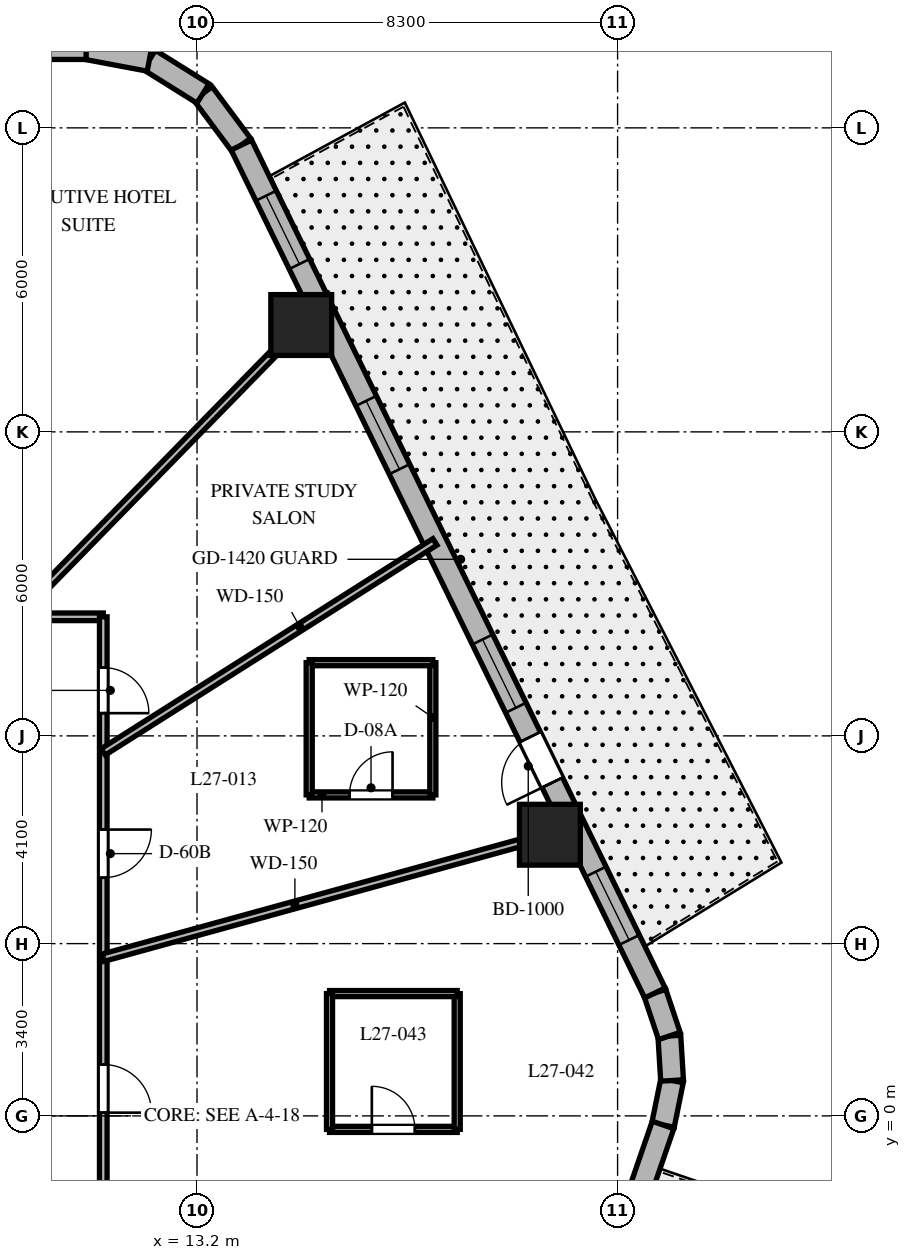
"""IFC4 building model, lengths in metres.
Left out: names, types, materials, properties, quantities, classifications, styles, units other than length and angle.
Written with IfcOpenShell. Run it as: python <this file> out.ifc"""

import sys

from ifc_helpers import new_model, si_unit, direction, frame, frame_2d, origin, origin_2d, place, context, subcontext, project, spatial, rectangle, extrude, element, fill, save


model = new_model("IFC4")
c1 = context("Model", 3, precision=1e-05, world=origin(), true_north=direction((0.0, 1.0)))
c2 = subcontext(c1, "Body", "Model", "MODEL_VIEW")
j1 = project(units=[si_unit("LENGTHUNIT", "METRE"), si_unit("PLANEANGLEUNIT", "RADIAN")], contexts=[c1])
p1 = place(None, origin())
s1 = spatial("IfcSite", under=j1, at=p1, CompositionType="ELEMENT")
p2 = place(p1, origin())
s2 = spatial("IfcBuilding", under=s1, at=p2, CompositionType="ELEMENT")
p3 = place(p2, frame((0.0, 0.0, 113.6)))
s3 = spatial("IfcBuildingStorey", under=s2, at=p3, CompositionType="ELEMENT", Elevation=113.6)
for number, where, z_axis, x_axis in (
    (1, (20.164, 5.549, 0.0), (0.0, 0.0, 1.0), (1.0, 0.0, 0.0)),
    (2, (15.257, 15.609, 0.0), (0.0, 0.0, 1.0), (1.0, 0.0, 0.0)),
):
    element("IfcColumn", number, at=place(p3, frame(where, z_axis=z_axis, x_axis=x_axis)), inside=s3, PredefinedType="COLUMN", context=c2, shape_type="SweptSolid", body=[
        extrude(rectangle(XDim=1.2, YDim=1.2, at=origin_2d()), origin(), (0.0, 0.0, 1.0), 3.7),
    ])
p4 = place(p3, frame((22.397, -0.179, 0.0), z_axis=(0.0, 0.0, 1.0), x_axis=(0.199313589404, 0.979935759669, 0.0)))
e3 = element("IfcWall", 3, at=p4, inside=s3, PredefinedType="SOLIDWALL", context=c2, shape_type="SweptSolid", body=[
    extrude(rectangle(XDim=0.896, YDim=0.45, at=frame_2d((0.448, 0.0))), origin(), (0.0, 0.0, 1.0), 3.4),
])
p5 = place(p3, frame((22.575, 0.698, 0.0), z_axis=(0.0, 0.0, 1.0), x_axis=(-0.060980441946, 0.998138961117, 0.0)))
e4 = element("IfcWall", 4, at=p5, inside=s3, PredefinedType="SOLIDWALL", context=c2, shape_type="SweptSolid", body=[
    extrude(rectangle(XDim=0.881, YDim=0.45, at=frame_2d((0.44, 0.0))), origin(), (0.0, 0.0, 1.0), 3.4),
])
p6 = place(p3, frame((22.522, 1.577, 0.0), z_axis=(0.0, 0.0, 1.0), x_axis=(-0.317372694837, 0.948300887151, 0.0)))
e5 = element("IfcWall", 5, at=p6, inside=s3, PredefinedType="SOLIDWALL", context=c2, shape_type="SweptSolid", body=[
    extrude(rectangle(XDim=0.896, YDim=0.45, at=frame_2d((0.448, 0.0))), origin(), (0.0, 0.0, 1.0), 3.4),
])
p7 = place(p3, frame((14.076, 19.161, 0.0), z_axis=(0.0, 0.0, 1.0), x_axis=(-0.597226657159, 0.802072515412, 0.0)))
e6 = element("IfcWall", 6, at=p7, inside=s3, PredefinedType="SOLIDWALL", context=c2, shape_type="SweptSolid", body=[
    extrude(rectangle(XDim=1.269, YDim=0.45, at=frame_2d((0.635, 0.0))), origin(), (0.0, 0.0, 1.0), 3.4),
])
p8 = place(p3, frame((13.318, 20.179, 0.0), z_axis=(0.0, 0.0, 1.0), x_axis=(-0.848031272749, 0.529946186362, 0.0)))
e7 = element("IfcWall", 7, at=p8, inside=s3, PredefinedType="SOLIDWALL", context=c2, shape_type="SweptSolid", body=[
    extrude(rectangle(XDim=1.248, YDim=0.45, at=frame_2d((0.624, 0.0))), origin(), (0.0, 0.0, 1.0), 3.4),
])
p9 = place(p3, frame((12.259, 20.84, 0.0), z_axis=(0.0, 0.0, 1.0), x_axis=(-0.982730354425, 0.185043374624, 0.0)))
e8 = element("IfcWall", 8, at=p9, inside=s3, PredefinedType="SOLIDWALL", context=c2, shape_type="SweptSolid", body=[
    extrude(rectangle(XDim=1.269, YDim=0.45, at=frame_2d((0.635, 0.0))), origin(), (0.0, 0.0, 1.0), 3.4),
])
p10 = place(p3, frame((15.992, -18.777, 0.0), z_axis=(0.0, 0.0, 1.0), x_axis=(0.325606988926, 0.945505202927, 0.0)))
e9 = element("IfcWall", 9, at=p10, inside=s3, PredefinedType="SOLIDWALL", context=c2, shape_type="SweptSolid", body=[
    extrude(rectangle(XDim=19.669, YDim=0.45, at=frame_2d((9.835, 0.0))), origin(), (0.0, 0.0, 1.0), 3.4),
])
p11 = place(p10, frame((4.909, 0.0, 0.0)))
e10 = element("IfcOpeningElement", 10, at=p11, cuts=e9, PredefinedType="OPENING", context=c2, shape_type="SweptSolid", body=[
    extrude(rectangle(XDim=0.95, YDim=2.15, at=frame_2d((0.475, 1.075))), frame((0.0, 0.235, 0.0), z_axis=(0.0, -1.0, 0.0), x_axis=(1.0, 0.0, 0.0)), (0.0, 0.0, 1.0), 0.47),
])
p12 = place(p10, frame((1.197, 0.0, 0.8)))
e11 = element("IfcOpeningElement", 11, at=p12, cuts=e9, PredefinedType="OPENING", context=c2, shape_type="SweptSolid", body=[
    extrude(rectangle(XDim=1.5, YDim=1.8, at=frame_2d((0.75, 0.9))), frame((0.0, 0.235, 0.0), z_axis=(0.0, -1.0, 0.0), x_axis=(1.0, 0.0, 0.0)), (0.0, 0.0, 1.0), 0.47),
])
p13 = place(p10, frame((6.714, 0.0, 0.8)))
e12 = element("IfcOpeningElement", 12, at=p13, cuts=e9, PredefinedType="OPENING", context=c2, shape_type="SweptSolid", body=[
    extrude(rectangle(XDim=1.5, YDim=1.8, at=frame_2d((0.75, 0.9))), frame((0.0, 0.235, 0.0), z_axis=(0.0, -1.0, 0.0), x_axis=(1.0, 0.0, 0.0)), (0.0, 0.0, 1.0), 0.47),
])
p14 = place(p10, frame((11.53, 0.0, 0.8)))
e13 = element("IfcOpeningElement", 13, at=p14, cuts=e9, PredefinedType="OPENING", context=c2, shape_type="SweptSolid", body=[
    extrude(rectangle(XDim=1.5, YDim=1.8, at=frame_2d((0.75, 0.9))), frame((0.0, 0.235, 0.0), z_axis=(0.0, -1.0, 0.0), x_axis=(1.0, 0.0, 0.0)), (0.0, 0.0, 1.0), 0.47),
])
p15 = place(p10, frame((16.918, 0.0, 0.8)))
e14 = element("IfcOpeningElement", 14, at=p15, cuts=e9, PredefinedType="OPENING", context=c2, shape_type="SweptSolid", body=[
    extrude(rectangle(XDim=1.5, YDim=1.8, at=frame_2d((0.75, 0.9))), frame((0.0, 0.235, 0.0), z_axis=(0.0, -1.0, 0.0), x_axis=(1.0, 0.0, 0.0)), (0.0, 0.0, 1.0), 0.47),
])
p16 = place(p3, frame((22.238, 2.427, 0.0), z_axis=(0.0, 0.0, 1.0), x_axis=(-0.438374803278, 0.898792262901, 0.0)))
e15 = element("IfcWall", 15, at=p16, inside=s3, PredefinedType="SOLIDWALL", context=c2, shape_type="SweptSolid", body=[
    extrude(rectangle(XDim=18.618, YDim=0.45, at=frame_2d((9.309, 0.0))), origin(), (0.0, 0.0, 1.0), 3.4),
])
p17 = place(p16, frame((4.62, 0.0, 0.0)))
e16 = element("IfcOpeningElement", 16, at=p17, cuts=e15, PredefinedType="OPENING", context=c2, shape_type="SweptSolid", body=[
    extrude(rectangle(XDim=1.0, YDim=2.15, at=frame_2d((0.5, 1.075))), frame((0.0, 0.235, 0.0), z_axis=(0.0, -1.0, 0.0), x_axis=(1.0, 0.0, 0.0)), (0.0, 0.0, 1.0), 0.47),
])
p18 = place(p16, frame((6.262, 0.0, 0.8)))
e17 = element("IfcOpeningElement", 17, at=p18, cuts=e15, PredefinedType="OPENING", context=c2, shape_type="SweptSolid", body=[
    extrude(rectangle(XDim=1.5, YDim=1.8, at=frame_2d((0.75, 0.9))), frame((0.0, 0.235, 0.0), z_axis=(0.0, -1.0, 0.0), x_axis=(1.0, 0.0, 0.0)), (0.0, 0.0, 1.0), 0.47),
])
p19 = place(p16, frame((11.501, 0.0, 0.8)))
e18 = element("IfcOpeningElement", 18, at=p19, cuts=e15, PredefinedType="OPENING", context=c2, shape_type="SweptSolid", body=[
    extrude(rectangle(XDim=1.5, YDim=1.8, at=frame_2d((0.75, 0.9))), frame((0.0, 0.235, 0.0), z_axis=(0.0, -1.0, 0.0), x_axis=(1.0, 0.0, 0.0)), (0.0, 0.0, 1.0), 0.47),
])
p20 = place(p16, frame((16.006, 0.0, 0.8)))
e19 = element("IfcOpeningElement", 19, at=p20, cuts=e15, PredefinedType="OPENING", context=c2, shape_type="SweptSolid", body=[
    extrude(rectangle(XDim=1.5, YDim=1.8, at=frame_2d((0.75, 0.9))), frame((0.0, 0.235, 0.0), z_axis=(0.0, -1.0, 0.0), x_axis=(1.0, 0.0, 0.0)), (0.0, 0.0, 1.0), 0.47),
])
p21 = place(p16, frame((1.163, 0.0, 0.8)))
e20 = element("IfcOpeningElement", 20, at=p21, cuts=e15, PredefinedType="OPENING", context=c2, shape_type="SweptSolid", body=[
    extrude(rectangle(XDim=1.5, YDim=1.8, at=frame_2d((0.75, 0.9))), frame((0.0, 0.235, 0.0), z_axis=(0.0, -1.0, 0.0), x_axis=(1.0, 0.0, 0.0)), (0.0, 0.0, 1.0), 0.47),
])
p22 = place(p3, frame((11.012, 21.075, 0.0), z_axis=(0.0, 0.0, 1.0), x_axis=(-1.0, 0.0, 0.0)))
e21 = element("IfcWall", 21, at=p22, inside=s3, PredefinedType="SOLIDWALL", context=c2, shape_type="SweptSolid", body=[
    extrude(rectangle(XDim=23.782, YDim=0.45, at=frame_2d((11.891, 0.0))), origin(), (0.0, 0.0, 1.0), 3.4),
])
p23 = place(p22, frame((1.542, 0.0, 0.8)))
e22 = element("IfcOpeningElement", 22, at=p23, cuts=e21, PredefinedType="OPENING", context=c2, shape_type="SweptSolid", body=[
    extrude(rectangle(XDim=1.5, YDim=1.8, at=frame_2d((0.75, 0.9))), frame((0.0, 0.235, 0.0), z_axis=(0.0, -1.0, 0.0), x_axis=(1.0, 0.0, 0.0)), (0.0, 0.0, 1.0), 0.47),
])
p24 = place(p22, frame((7.82, 0.0, 0.8)))
e23 = element("IfcOpeningElement", 23, at=p24, cuts=e21, PredefinedType="OPENING", context=c2, shape_type="SweptSolid", body=[
    extrude(rectangle(XDim=1.5, YDim=1.8, at=frame_2d((0.75, 0.9))), frame((0.0, 0.235, 0.0), z_axis=(0.0, -1.0, 0.0), x_axis=(1.0, 0.0, 0.0)), (0.0, 0.0, 1.0), 0.47),
])
p25 = place(p22, frame((14.388, 0.0, 0.8)))
e24 = element("IfcOpeningElement", 24, at=p25, cuts=e21, PredefinedType="OPENING", context=c2, shape_type="SweptSolid", body=[
    extrude(rectangle(XDim=1.5, YDim=1.8, at=frame_2d((0.75, 0.9))), frame((0.0, 0.235, 0.0), z_axis=(0.0, -1.0, 0.0), x_axis=(1.0, 0.0, 0.0)), (0.0, 0.0, 1.0), 0.47),
])
p26 = place(p22, frame((20.741, 0.0, 0.8)))
e25 = element("IfcOpeningElement", 25, at=p26, cuts=e21, PredefinedType="OPENING", context=c2, shape_type="SweptSolid", body=[
    extrude(rectangle(XDim=1.5, YDim=1.8, at=frame_2d((0.75, 0.9))), frame((0.0, 0.235, 0.0), z_axis=(0.0, -1.0, 0.0), x_axis=(1.0, 0.0, 0.0)), (0.0, 0.0, 1.0), 0.47),
])
p27 = place(p3, frame((-11.35, 9.85, 0.0), z_axis=(0.0, 0.0, 1.0), x_axis=(1.0, 0.0, 0.0)))
e26 = element("IfcWall", 26, at=p27, inside=s3, PredefinedType="PARTITIONING", context=c2, shape_type="SweptSolid", body=[
    extrude(rectangle(XDim=22.7, YDim=0.15, at=frame_2d((11.35, 0.0))), origin(), (0.0, 0.0, 1.0), 2.84),
])
p28 = place(p27, frame((17.237, 0.0, 0.0)))
e27 = element("IfcOpeningElement", 27, at=p28, cuts=e26, PredefinedType="OPENING", context=c2, shape_type="SweptSolid", body=[
    extrude(rectangle(XDim=0.95, YDim=2.03, at=frame_2d((0.475, 1.015))), frame((0.0, 0.085, 0.0), z_axis=(0.0, -1.0, 0.0), x_axis=(1.0, 0.0, 0.0)), (0.0, 0.0, 1.0), 0.17),
])
p29 = place(p27, frame((12.192, 0.0, 0.0)))
e28 = element("IfcOpeningElement", 28, at=p29, cuts=e26, PredefinedType="OPENING", context=c2, shape_type="SweptSolid", body=[
    extrude(rectangle(XDim=0.95, YDim=2.03, at=frame_2d((0.475, 1.015))), frame((0.0, 0.085, 0.0), z_axis=(0.0, -1.0, 0.0), x_axis=(1.0, 0.0, 0.0)), (0.0, 0.0, 1.0), 0.17),
])
p30 = place(p27, frame((8.757, 0.0, 0.0)))
e29 = element("IfcOpeningElement", 29, at=p30, cuts=e26, PredefinedType="OPENING", context=c2, shape_type="SweptSolid", body=[
    extrude(rectangle(XDim=0.95, YDim=2.03, at=frame_2d((0.475, 1.015))), frame((0.0, 0.085, 0.0), z_axis=(0.0, -1.0, 0.0), x_axis=(1.0, 0.0, 0.0)), (0.0, 0.0, 1.0), 0.17),
])
p31 = place(p27, frame((3.399, 0.0, 0.0)))
e30 = element("IfcOpeningElement", 30, at=p31, cuts=e26, PredefinedType="OPENING", context=c2, shape_type="SweptSolid", body=[
    extrude(rectangle(XDim=0.95, YDim=2.03, at=frame_2d((0.475, 1.015))), frame((0.0, 0.085, 0.0), z_axis=(0.0, -1.0, 0.0), x_axis=(1.0, 0.0, 0.0)), (0.0, 0.0, 1.0), 0.17),
])
p32 = place(p3, frame((11.35, 9.85, 0.0), z_axis=(0.0, 0.0, 1.0), x_axis=(0.0, -1.0, 0.0)))
e31 = element("IfcWall", 31, at=p32, inside=s3, PredefinedType="PARTITIONING", context=c2, shape_type="SweptSolid", body=[
    extrude(rectangle(XDim=19.7, YDim=0.15, at=frame_2d((9.85, 0.0))), origin(), (0.0, 0.0, 1.0), 2.84),
])
p33 = place(p32, frame((4.199, 0.0, 0.0)))
e32 = element("IfcOpeningElement", 32, at=p33, cuts=e31, PredefinedType="OPENING", context=c2, shape_type="SweptSolid", body=[
    extrude(rectangle(XDim=0.95, YDim=2.03, at=frame_2d((0.475, 1.015))), frame((0.0, 0.085, 0.0), z_axis=(0.0, -1.0, 0.0), x_axis=(1.0, 0.0, 0.0)), (0.0, 0.0, 1.0), 0.17),
])
p34 = place(p32, frame((1.002, 0.0, 0.0)))
e33 = element("IfcOpeningElement", 33, at=p34, cuts=e31, PredefinedType="OPENING", context=c2, shape_type="SweptSolid", body=[
    extrude(rectangle(XDim=0.9, YDim=2.03, at=frame_2d((0.45, 1.015))), frame((0.0, 0.085, 0.0), z_axis=(0.0, -1.0, 0.0), x_axis=(1.0, 0.0, 0.0)), (0.0, 0.0, 1.0), 0.17),
])
p35 = place(p32, frame((17.197, 0.0, 0.0)))
e34 = element("IfcOpeningElement", 34, at=p35, cuts=e31, PredefinedType="OPENING", context=c2, shape_type="SweptSolid", body=[
    extrude(rectangle(XDim=0.9, YDim=2.03, at=frame_2d((0.45, 1.015))), frame((0.0, 0.085, 0.0), z_axis=(0.0, -1.0, 0.0), x_axis=(1.0, 0.0, 0.0)), (0.0, 0.0, 1.0), 0.17),
])
p36 = place(p32, frame((13.408, 0.0, 0.0)))
e35 = element("IfcOpeningElement", 35, at=p36, cuts=e31, PredefinedType="OPENING", context=c2, shape_type="SweptSolid", body=[
    extrude(rectangle(XDim=0.95, YDim=2.03, at=frame_2d((0.475, 1.015))), frame((0.0, 0.085, 0.0), z_axis=(0.0, -1.0, 0.0), x_axis=(1.0, 0.0, 0.0)), (0.0, 0.0, 1.0), 0.17),
])
p37 = place(p32, frame((8.836, 0.0, 0.0)))
e36 = element("IfcOpeningElement", 36, at=p37, cuts=e31, PredefinedType="OPENING", context=c2, shape_type="SweptSolid", body=[
    extrude(rectangle(XDim=0.95, YDim=2.03, at=frame_2d((0.475, 1.015))), frame((0.0, 0.085, 0.0), z_axis=(0.0, -1.0, 0.0), x_axis=(1.0, 0.0, 0.0)), (0.0, 0.0, 1.0), 0.17),
])
p38 = place(p3, frame((11.35, 3.123, 0.0), z_axis=(0.0, 0.0, 1.0), x_axis=(0.964151983214, 0.265350623261, 0.0)))
e37 = element("IfcWall", 37, at=p38, inside=s3, PredefinedType="PARTITIONING", context=c2, shape_type="SweptSolid", body=[
    extrude(rectangle(XDim=9.645, YDim=0.15, at=frame_2d((4.823, 0.0))), origin(), (0.0, 0.0, 1.0), 2.54),
])
p39 = place(p3, frame((11.35, 7.185, 0.0), z_axis=(0.0, 0.0, 1.0), x_axis=(0.844928274737, 0.534879622485, 0.0)))
e38 = element("IfcWall", 38, at=p39, inside=s3, PredefinedType="PARTITIONING", context=c2, shape_type="SweptSolid", body=[
    extrude(rectangle(XDim=7.747, YDim=0.15, at=frame_2d((3.874, 0.0))), origin(), (0.0, 0.0, 1.0), 2.54),
])
p40 = place(p3, frame((9.628, 9.85, 0.0), z_axis=(0.0, 0.0, 1.0), x_axis=(0.698992824326, 0.715128681805, 0.0)))
e39 = element("IfcWall", 39, at=p40, inside=s3, PredefinedType="PARTITIONING", context=c2, shape_type="SweptSolid", body=[
    extrude(rectangle(XDim=8.579, YDim=0.15, at=frame_2d((4.29, 0.0))), origin(), (0.0, 0.0, 1.0), 2.54),
])
p41 = place(p3, frame((15.414, 6.335, 0.0), z_axis=(0.0, 0.0, 1.0), x_axis=(1.0, 0.0, 0.0)))
e40 = element("IfcWall", 40, at=p41, inside=s3, PredefinedType="PARTITIONING", context=c2, shape_type="SweptSolid", body=[
    extrude(rectangle(XDim=2.44, YDim=0.12, at=frame_2d((1.22, 0.0))), origin(), (0.0, 0.0, 1.0), 2.84),
])
p42 = place(p41, frame((0.795, 0.0, 0.0)))
e41 = element("IfcOpeningElement", 41, at=p42, cuts=e40, PredefinedType="OPENING", context=c2, shape_type="SweptSolid", body=[
    extrude(rectangle(XDim=0.85, YDim=2.03, at=frame_2d((0.425, 1.015))), frame((0.0, 0.07, 0.0), z_axis=(0.0, -1.0, 0.0), x_axis=(1.0, 0.0, 0.0)), (0.0, 0.0, 1.0), 0.14),
])
p43 = place(p3, frame((17.854, 6.335, 0.0), z_axis=(0.0, 0.0, 1.0), x_axis=(0.0, 1.0, 0.0)))
e42 = element("IfcWall", 42, at=p43, inside=s3, PredefinedType="PARTITIONING", context=c2, shape_type="SweptSolid", body=[
    extrude(rectangle(XDim=2.61, YDim=0.12, at=frame_2d((1.305, 0.0))), origin(), (0.0, 0.0, 1.0), 3.4),
])
p44 = place(p3, frame((17.854, 8.945, 0.0), z_axis=(0.0, 0.0, 1.0), x_axis=(-1.0, 0.0, 0.0)))
e43 = element("IfcWall", 43, at=p44, inside=s3, PredefinedType="PARTITIONING", context=c2, shape_type="SweptSolid", body=[
    extrude(rectangle(XDim=2.44, YDim=0.12, at=frame_2d((1.22, 0.0))), origin(), (0.0, 0.0, 1.0), 3.4),
])
p45 = place(p3, frame((15.414, 8.945, 0.0), z_axis=(0.0, 0.0, 1.0), x_axis=(0.0, -1.0, 0.0)))
e44 = element("IfcWall", 44, at=p45, inside=s3, PredefinedType="PARTITIONING", context=c2, shape_type="SweptSolid", body=[
    extrude(rectangle(XDim=2.61, YDim=0.12, at=frame_2d((1.305, 0.0))), origin(), (0.0, 0.0, 1.0), 2.84),
])
p46 = place(p3, frame((15.815, -0.266, 0.0), z_axis=(0.0, 0.0, 1.0), x_axis=(1.0, 0.0, 0.0)))
e45 = element("IfcWall", 45, at=p46, inside=s3, PredefinedType="PARTITIONING", context=c2, shape_type="SweptSolid", body=[
    extrude(rectangle(XDim=2.52, YDim=0.12, at=frame_2d((1.26, 0.0))), origin(), (0.0, 0.0, 1.0), 2.84),
])
p47 = place(p46, frame((0.835, 0.0, 0.0)))
e46 = element("IfcOpeningElement", 46, at=p47, cuts=e45, PredefinedType="OPENING", context=c2, shape_type="SweptSolid", body=[
    extrude(rectangle(XDim=0.85, YDim=2.03, at=frame_2d((0.425, 1.015))), frame((0.0, 0.07, 0.0), z_axis=(0.0, -1.0, 0.0), x_axis=(1.0, 0.0, 0.0)), (0.0, 0.0, 1.0), 0.14),
])
p48 = place(p3, frame((18.335, -0.266, 0.0), z_axis=(0.0, 0.0, 1.0), x_axis=(0.0, 1.0, 0.0)))
e47 = element("IfcWall", 47, at=p48, inside=s3, PredefinedType="PARTITIONING", context=c2, shape_type="SweptSolid", body=[
    extrude(rectangle(XDim=2.68, YDim=0.12, at=frame_2d((1.34, 0.0))), origin(), (0.0, 0.0, 1.0), 3.4),
])
p49 = place(p3, frame((18.335, 2.414, 0.0), z_axis=(0.0, 0.0, 1.0), x_axis=(-1.0, 0.0, 0.0)))
e48 = element("IfcWall", 48, at=p49, inside=s3, PredefinedType="PARTITIONING", context=c2, shape_type="SweptSolid", body=[
    extrude(rectangle(XDim=2.52, YDim=0.12, at=frame_2d((1.26, 0.0))), origin(), (0.0, 0.0, 1.0), 2.84),
])
p50 = place(p3, frame((15.815, 2.414, 0.0), z_axis=(0.0, 0.0, 1.0), x_axis=(0.0, -1.0, 0.0)))
e49 = element("IfcWall", 49, at=p50, inside=s3, PredefinedType="PARTITIONING", context=c2, shape_type="SweptSolid", body=[
    extrude(rectangle(XDim=2.68, YDim=0.12, at=frame_2d((1.34, 0.0))), origin(), (0.0, 0.0, 1.0), 3.4),
])
p51 = place(p17, origin())
e50 = element("IfcDoor", 50, at=p51, inside=s3, OperationType="SINGLE_SWING_LEFT", PredefinedType="DOOR", context=c2, shape_type="SweptSolid", body=[
    extrude(rectangle(XDim=1.0, YDim=2.15, at=frame_2d((0.5, 1.075))), frame((0.0, 0.025, 0.0), z_axis=(0.0, -1.0, 0.0), x_axis=(1.0, 0.0, 0.0)), (0.0, 0.0, 1.0), 0.05),
])
fill(e16, e50)
p52 = place(p18, origin())
e51 = element("IfcWindow", 51, at=p52, inside=s3, PartitioningType="SINGLE_PANEL", PredefinedType="WINDOW", context=c2, shape_type="SweptSolid", body=[
    extrude(rectangle(XDim=1.5, YDim=1.8, at=frame_2d((0.75, 0.9))), frame((0.0, 0.03, 0.0), z_axis=(0.0, -1.0, 0.0), x_axis=(1.0, 0.0, 0.0)), (0.0, 0.0, 1.0), 0.06),
])
fill(e17, e51)
p53 = place(p19, origin())
e52 = element("IfcWindow", 52, at=p53, inside=s3, PartitioningType="SINGLE_PANEL", PredefinedType="WINDOW", context=c2, shape_type="SweptSolid", body=[
    extrude(rectangle(XDim=1.5, YDim=1.8, at=frame_2d((0.75, 0.9))), frame((0.0, 0.03, 0.0), z_axis=(0.0, -1.0, 0.0), x_axis=(1.0, 0.0, 0.0)), (0.0, 0.0, 1.0), 0.06),
])
fill(e18, e52)
p54 = place(p20, origin())
e53 = element("IfcWindow", 53, at=p54, inside=s3, PartitioningType="SINGLE_PANEL", PredefinedType="WINDOW", context=c2, shape_type="SweptSolid", body=[
    extrude(rectangle(XDim=1.5, YDim=1.8, at=frame_2d((0.75, 0.9))), frame((0.0, 0.03, 0.0), z_axis=(0.0, -1.0, 0.0), x_axis=(1.0, 0.0, 0.0)), (0.0, 0.0, 1.0), 0.06),
])
fill(e19, e53)
p55 = place(p21, origin())
e54 = element("IfcWindow", 54, at=p55, inside=s3, PartitioningType="SINGLE_PANEL", PredefinedType="WINDOW", context=c2, shape_type="SweptSolid", body=[
    extrude(rectangle(XDim=1.5, YDim=1.8, at=frame_2d((0.75, 0.9))), frame((0.0, 0.03, 0.0), z_axis=(0.0, -1.0, 0.0), x_axis=(1.0, 0.0, 0.0)), (0.0, 0.0, 1.0), 0.06),
])
fill(e20, e54)
p56 = place(p33, origin())
e55 = element("IfcDoor", 55, at=p56, inside=s3, OperationType="SINGLE_SWING_LEFT", PredefinedType="DOOR", context=c2, shape_type="SweptSolid", body=[
    extrude(rectangle(XDim=0.95, YDim=2.03, at=frame_2d((0.475, 1.015))), frame((0.0, 0.025, 0.0), z_axis=(0.0, -1.0, 0.0), x_axis=(1.0, 0.0, 0.0)), (0.0, 0.0, 1.0), 0.05),
])
fill(e32, e55)
p57 = place(p42, origin())
e56 = element("IfcDoor", 56, at=p57, inside=s3, OperationType="SINGLE_SWING_RIGHT", PredefinedType="DOOR", context=c2, shape_type="SweptSolid", body=[
    extrude(rectangle(XDim=0.85, YDim=2.03, at=frame_2d((0.425, 1.015))), frame((0.0, 0.025, 0.0), z_axis=(0.0, -1.0, 0.0), x_axis=(1.0, 0.0, 0.0)), (0.0, 0.0, 1.0), 0.05),
])
fill(e41, e56)
p58 = place(p34, origin())
e57 = element("IfcDoor", 57, at=p58, inside=s3, OperationType="SINGLE_SWING_RIGHT", PredefinedType="DOOR", context=c2, shape_type="SweptSolid", body=[
    extrude(rectangle(XDim=0.9, YDim=2.03, at=frame_2d((0.45, 1.015))), frame((0.0, 0.025, 0.0), z_axis=(0.0, -1.0, 0.0), x_axis=(1.0, 0.0, 0.0)), (0.0, 0.0, 1.0), 0.05),
])
fill(e33, e57)
p59 = place(p37, origin())
e58 = element("IfcDoor", 58, at=p59, inside=s3, OperationType="SINGLE_SWING_RIGHT", PredefinedType="DOOR", context=c2, shape_type="SweptSolid", body=[
    extrude(rectangle(XDim=0.95, YDim=2.03, at=frame_2d((0.475, 1.015))), frame((0.0, 0.025, 0.0), z_axis=(0.0, -1.0, 0.0), x_axis=(1.0, 0.0, 0.0)), (0.0, 0.0, 1.0), 0.05),
])
fill(e36, e58)
p60 = place(p47, origin())
e59 = element("IfcDoor", 59, at=p60, inside=s3, OperationType="SINGLE_SWING_LEFT", PredefinedType="DOOR", context=c2, shape_type="SweptSolid", body=[
    extrude(rectangle(XDim=0.85, YDim=2.03, at=frame_2d((0.425, 1.015))), frame((0.0, 0.025, 0.0), z_axis=(0.0, -1.0, 0.0), x_axis=(1.0, 0.0, 0.0)), (0.0, 0.0, 1.0), 0.05),
])
fill(e46, e59)
save(model, sys.argv[1])
